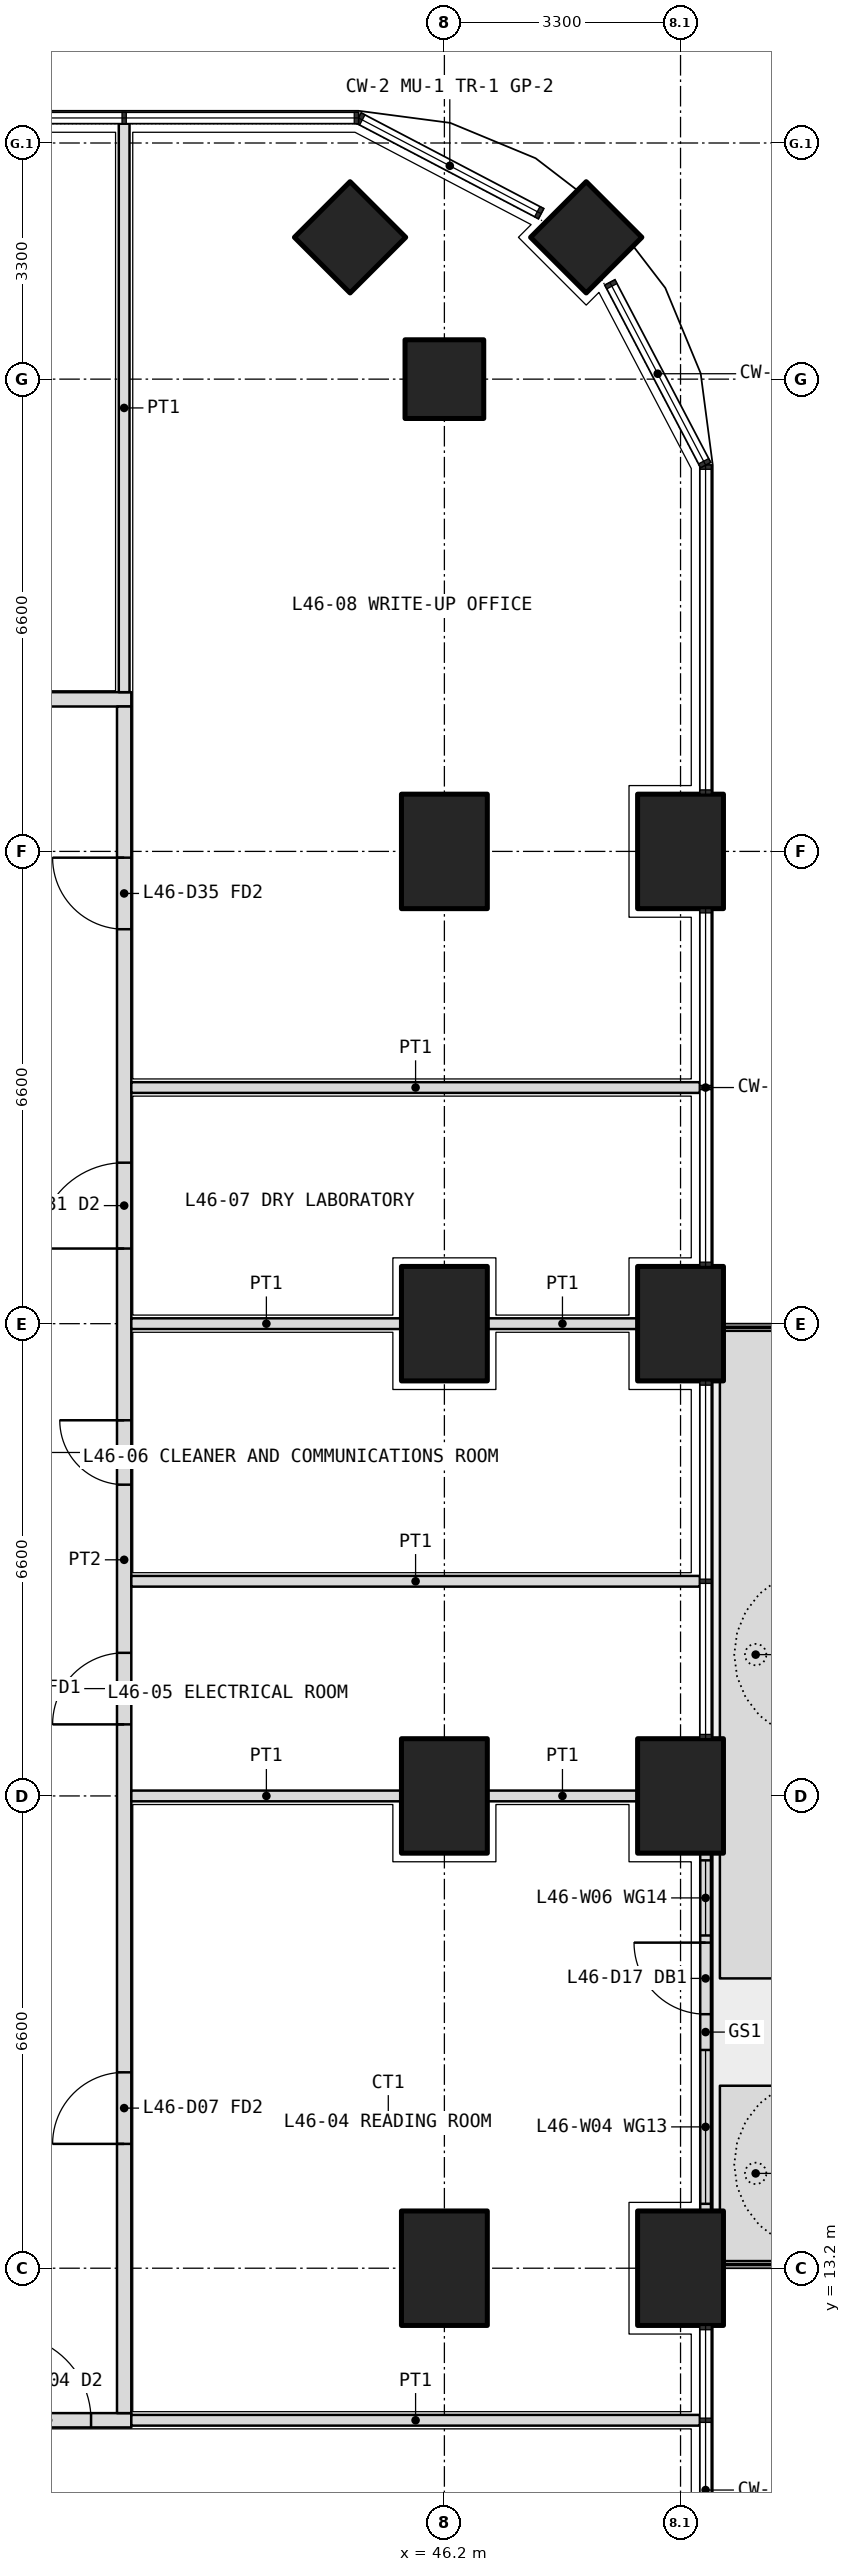
"""IFC4 building model, lengths in metres.
Left out: names, types, materials, properties, quantities, classifications, styles, units other than length and angle.
Written with IfcOpenShell. Run it as: python <this file> out.ifc"""

import sys

from ifc_helpers import new_model, si_unit, direction, frame, frame_2d, origin, origin_2d, place, context, subcontext, project, spatial, polyline, rectangle, outline, extrude, element, fill, save


model = new_model("IFC4")
c1 = context("Model", 3, precision=1e-05, world=origin(), true_north=direction((0.0, 1.0)))
c2 = subcontext(c1, "Body", "Model", "MODEL_VIEW")
j1 = project(units=[si_unit("LENGTHUNIT", "METRE"), si_unit("PLANEANGLEUNIT", "RADIAN")], contexts=[c1])
p1 = place(None, origin())
s1 = spatial("IfcSite", under=j1, at=p1, CompositionType="ELEMENT")
p2 = place(p1, origin())
s2 = spatial("IfcBuilding", under=s1, at=p2, CompositionType="ELEMENT")
p3 = place(p2, frame((0.0, 0.0, 201.9)))
s3 = spatial("IfcBuildingStorey", under=s2, at=p3, CompositionType="ELEMENT", Elevation=201.9)
p4 = place(p3, frame((48.182, 41.582, 0.0), z_axis=(0.0, 0.0, 1.0), x_axis=(0.707106781187, 0.707106781187, 0.0)))
e1 = element("IfcColumn", 1, at=p4, inside=s3, PredefinedType="COLUMN", context=c2, shape_type="SweptSolid", body=[
    extrude(rectangle(XDim=1.1, YDim=1.1, at=origin_2d()), origin(), (0.0, 0.0, 1.0), 4.2),
])
for number, where, z_axis, x_axis in (
    (2, (49.5, 13.2, 0.0), (0.0, 0.0, 1.0), (0.0, 1.0, 0.0)),
    (3, (49.5, 19.8, 0.0), (0.0, 0.0, 1.0), (0.0, 1.0, 0.0)),
    (4, (49.5, 26.4, 0.0), (0.0, 0.0, 1.0), (0.0, 1.0, 0.0)),
    (5, (49.5, 33.0, 0.0), (0.0, 0.0, 1.0), (0.0, 1.0, 0.0)),
):
    element("IfcColumn", number, at=place(p3, frame(where, z_axis=z_axis, x_axis=x_axis)), inside=s3, PredefinedType="COLUMN", context=c2, shape_type="SweptSolid", body=[
        extrude(rectangle(XDim=1.6, YDim=1.2, at=origin_2d()), origin(), (0.0, 0.0, 1.0), 4.2),
    ])
for number, where, z_axis, x_axis in (
    (6, (46.2, 39.6, 0.0), (0.0, 0.0, 1.0), (1.0, 0.0, 0.0)),
    (7, (44.882, 41.582, 0.0), (0.0, 0.0, 1.0), (0.707, 0.707, 0.0)),
):
    element("IfcColumn", number, at=place(p3, frame(where, z_axis=z_axis, x_axis=x_axis)), inside=s3, PredefinedType="COLUMN", context=c2, shape_type="SweptSolid", body=[
        extrude(rectangle(XDim=1.1, YDim=1.1, at=origin_2d()), origin(), (0.0, 0.0, 1.0), 4.2),
    ])
for number, where, z_axis, x_axis in (
    (8, (46.2, 13.2, 0.0), (0.0, 0.0, 1.0), (0.0, 1.0, 0.0)),
    (9, (46.2, 19.8, 0.0), (0.0, 0.0, 1.0), (0.0, 1.0, 0.0)),
    (10, (46.2, 26.4, 0.0), (0.0, 0.0, 1.0), (0.0, 1.0, 0.0)),
    (11, (46.2, 33.0, 0.0), (0.0, 0.0, 1.0), (0.0, 1.0, 0.0)),
):
    element("IfcColumn", number, at=place(p3, frame(where, z_axis=z_axis, x_axis=x_axis)), inside=s3, PredefinedType="COLUMN", context=c2, shape_type="SweptSolid", body=[
        extrude(rectangle(XDim=1.6, YDim=1.2, at=origin_2d()), origin(), (0.0, 0.0, 1.0), 4.2),
    ])
p5 = place(p3, origin())
e12 = element("IfcWall", 12, at=p5, inside=s3, PredefinedType="USERDEFINED", context=c2, shape_type="SweptSolid", body=[
    extrude(outline(polyline([(50.05, 13.3), (51.05, 13.3), (51.05, 15.75), (50.05, 15.75), (50.05, 13.3)]), holes=[polyline([(50.2, 13.45), (50.9, 13.45), (50.9, 15.6), (50.2, 15.6), (50.2, 13.45)])]), origin(), (0.0, 0.0, 1.0), 1.05),
])
p6 = place(p3, origin())
e13 = element("IfcWall", 13, at=p6, inside=s3, PredefinedType="USERDEFINED", context=c2, shape_type="SweptSolid", body=[
    extrude(outline(polyline([(50.05, 17.25), (51.05, 17.25), (51.05, 26.3), (50.05, 26.3), (50.05, 17.25)]), holes=[polyline([(50.2, 17.4), (50.9, 17.4), (50.9, 26.15), (50.2, 26.15), (50.2, 17.4)])]), origin(), (0.0, 0.0, 1.0), 1.05),
])
p7 = place(p3, frame((49.85, 14.0, 0.0), z_axis=(0.0, 0.0, 1.0), x_axis=(0.0, 1.0, 0.0)))
e14 = element("IfcWall", 14, at=p7, inside=s3, PredefinedType="SOLIDWALL", context=c2, shape_type="SweptSolid", body=[
    extrude(rectangle(XDim=5.0, YDim=0.15, at=frame_2d((2.5, 0.0))), origin(), (0.0, 0.0, 1.0), 2.7),
])
p8 = place(p7, frame((2.75, 0.0, 0.0)))
e15 = element("IfcOpeningElement", 15, at=p8, cuts=e14, PredefinedType="OPENING", context=c2, shape_type="SweptSolid", body=[
    extrude(rectangle(XDim=1.0, YDim=2.4, at=frame_2d((0.5, 1.2))), frame((0.0, 0.085, 0.0), z_axis=(0.0, -1.0, 0.0), x_axis=(1.0, 0.0, 0.0)), (0.0, 0.0, 1.0), 0.17),
])
p9 = place(p7, frame((0.1, 0.0, 0.1)))
e16 = element("IfcOpeningElement", 16, at=p9, cuts=e14, PredefinedType="OPENING", context=c2, shape_type="SweptSolid", body=[
    extrude(rectangle(XDim=2.15, YDim=2.3, at=frame_2d((1.075, 1.15))), frame((0.0, 0.085, 0.0), z_axis=(0.0, -1.0, 0.0), x_axis=(1.0, 0.0, 0.0)), (0.0, 0.0, 1.0), 0.17),
])
p10 = place(p7, frame((3.85, 0.0, 0.1)))
e17 = element("IfcOpeningElement", 17, at=p10, cuts=e14, PredefinedType="OPENING", context=c2, shape_type="SweptSolid", body=[
    extrude(rectangle(XDim=1.05, YDim=2.3, at=frame_2d((0.525, 1.15))), frame((0.0, 0.085, 0.0), z_axis=(0.0, -1.0, 0.0), x_axis=(1.0, 0.0, 0.0)), (0.0, 0.0, 1.0), 0.17),
])
p11 = place(p3, frame((10.975, 11.075, 0.0), z_axis=(0.0, 0.0, 1.0), x_axis=(1.0, 0.0, 0.0)))
e18 = element("IfcWall", 18, at=p11, inside=s3, PredefinedType="PARTITIONING", context=c2, shape_type="SweptSolid", body=[
    extrude(rectangle(XDim=30.85, YDim=0.2, at=frame_2d((15.425, 0.0))), origin(), (0.0, 0.0, 1.0), 2.85),
])
p12 = place(p11, frame((2.212, 0.0, 0.0)))
e19 = element("IfcOpeningElement", 19, at=p12, cuts=e18, PredefinedType="OPENING", context=c2, shape_type="SweptSolid", body=[
    extrude(rectangle(XDim=1.2, YDim=2.1, at=frame_2d((0.6, 1.05))), frame((0.0, 0.11, 0.0), z_axis=(0.0, -1.0, 0.0), x_axis=(1.0, 0.0, 0.0)), (0.0, 0.0, 1.0), 0.22),
])
p13 = place(p11, frame((16.475, 0.0, 0.0)))
e20 = element("IfcOpeningElement", 20, at=p13, cuts=e18, PredefinedType="OPENING", context=c2, shape_type="SweptSolid", body=[
    extrude(rectangle(XDim=1.2, YDim=2.1, at=frame_2d((0.6, 1.05))), frame((0.0, 0.11, 0.0), z_axis=(0.0, -1.0, 0.0), x_axis=(1.0, 0.0, 0.0)), (0.0, 0.0, 1.0), 0.22),
])
p14 = place(p11, frame((29.087, 0.0, 0.0)))
e21 = element("IfcOpeningElement", 21, at=p14, cuts=e18, PredefinedType="OPENING", context=c2, shape_type="SweptSolid", body=[
    extrude(rectangle(XDim=1.2, YDim=2.1, at=frame_2d((0.6, 1.05))), frame((0.0, 0.11, 0.0), z_axis=(0.0, -1.0, 0.0), x_axis=(1.0, 0.0, 0.0)), (0.0, 0.0, 1.0), 0.22),
])
p15 = place(p3, frame((10.975, 35.125, 0.0), z_axis=(0.0, 0.0, 1.0), x_axis=(1.0, 0.0, 0.0)))
e22 = element("IfcWall", 22, at=p15, inside=s3, PredefinedType="PARTITIONING", context=c2, shape_type="SweptSolid", body=[
    extrude(rectangle(XDim=30.85, YDim=0.2, at=frame_2d((15.425, 0.0))), origin(), (0.0, 0.0, 1.0), 2.85),
])
p16 = place(p15, frame((0.562, 0.0, 0.0)))
e23 = element("IfcOpeningElement", 23, at=p16, cuts=e22, PredefinedType="OPENING", context=c2, shape_type="SweptSolid", body=[
    extrude(rectangle(XDim=1.2, YDim=2.1, at=frame_2d((0.6, 1.05))), frame((0.0, 0.11, 0.0), z_axis=(0.0, -1.0, 0.0), x_axis=(1.0, 0.0, 0.0)), (0.0, 0.0, 1.0), 0.22),
])
p17 = place(p15, frame((3.425, 0.0, 0.0)))
e24 = element("IfcOpeningElement", 24, at=p17, cuts=e22, PredefinedType="OPENING", context=c2, shape_type="SweptSolid", body=[
    extrude(rectangle(XDim=1.0, YDim=2.1, at=frame_2d((0.5, 1.05))), frame((0.0, 0.11, 0.0), z_axis=(0.0, -1.0, 0.0), x_axis=(1.0, 0.0, 0.0)), (0.0, 0.0, 1.0), 0.22),
])
p18 = place(p15, frame((6.725, 0.0, 0.0)))
e25 = element("IfcOpeningElement", 25, at=p18, cuts=e22, PredefinedType="OPENING", context=c2, shape_type="SweptSolid", body=[
    extrude(rectangle(XDim=1.0, YDim=2.1, at=frame_2d((0.5, 1.05))), frame((0.0, 0.11, 0.0), z_axis=(0.0, -1.0, 0.0), x_axis=(1.0, 0.0, 0.0)), (0.0, 0.0, 1.0), 0.22),
])
p19 = place(p15, frame((9.975, 0.0, 0.0)))
e26 = element("IfcOpeningElement", 26, at=p19, cuts=e22, PredefinedType="OPENING", context=c2, shape_type="SweptSolid", body=[
    extrude(rectangle(XDim=1.0, YDim=2.1, at=frame_2d((0.5, 1.05))), frame((0.0, 0.11, 0.0), z_axis=(0.0, -1.0, 0.0), x_axis=(1.0, 0.0, 0.0)), (0.0, 0.0, 1.0), 0.22),
])
p20 = place(p15, frame((20.938, 0.0, 0.0)))
e27 = element("IfcOpeningElement", 27, at=p20, cuts=e22, PredefinedType="OPENING", context=c2, shape_type="SweptSolid", body=[
    extrude(rectangle(XDim=1.0, YDim=2.1, at=frame_2d((0.5, 1.05))), frame((0.0, 0.11, 0.0), z_axis=(0.0, -1.0, 0.0), x_axis=(1.0, 0.0, 0.0)), (0.0, 0.0, 1.0), 0.22),
])
p21 = place(p3, frame((41.725, 11.175, 0.0), z_axis=(0.0, 0.0, 1.0), x_axis=(0.0, 1.0, 0.0)))
e28 = element("IfcWall", 28, at=p21, inside=s3, PredefinedType="PARTITIONING", context=c2, shape_type="SweptSolid", body=[
    extrude(rectangle(XDim=23.85, YDim=0.2, at=frame_2d((11.925, 0.0))), origin(), (0.0, 0.0, 1.0), 2.85),
])
p22 = place(p21, frame((3.762, 0.0, 0.0)))
e29 = element("IfcOpeningElement", 29, at=p22, cuts=e28, PredefinedType="OPENING", context=c2, shape_type="SweptSolid", body=[
    extrude(rectangle(XDim=1.0, YDim=2.1, at=frame_2d((0.5, 1.05))), frame((0.0, 0.11, 0.0), z_axis=(0.0, -1.0, 0.0), x_axis=(1.0, 0.0, 0.0)), (0.0, 0.0, 1.0), 0.22),
])
p23 = place(p21, frame((9.625, 0.0, 0.0)))
e30 = element("IfcOpeningElement", 30, at=p23, cuts=e28, PredefinedType="OPENING", context=c2, shape_type="SweptSolid", body=[
    extrude(rectangle(XDim=1.0, YDim=2.1, at=frame_2d((0.5, 1.05))), frame((0.0, 0.11, 0.0), z_axis=(0.0, -1.0, 0.0), x_axis=(1.0, 0.0, 0.0)), (0.0, 0.0, 1.0), 0.22),
])
p24 = place(p21, frame((12.975, 0.0, 0.0)))
e31 = element("IfcOpeningElement", 31, at=p24, cuts=e28, PredefinedType="OPENING", context=c2, shape_type="SweptSolid", body=[
    extrude(rectangle(XDim=0.9, YDim=2.1, at=frame_2d((0.45, 1.05))), frame((0.0, 0.11, 0.0), z_axis=(0.0, -1.0, 0.0), x_axis=(1.0, 0.0, 0.0)), (0.0, 0.0, 1.0), 0.22),
])
p25 = place(p21, frame((16.275, 0.0, 0.0)))
e32 = element("IfcOpeningElement", 32, at=p25, cuts=e28, PredefinedType="OPENING", context=c2, shape_type="SweptSolid", body=[
    extrude(rectangle(XDim=1.2, YDim=2.1, at=frame_2d((0.6, 1.05))), frame((0.0, 0.11, 0.0), z_axis=(0.0, -1.0, 0.0), x_axis=(1.0, 0.0, 0.0)), (0.0, 0.0, 1.0), 0.22),
])
p26 = place(p21, frame((20.738, 0.0, 0.0)))
e33 = element("IfcOpeningElement", 33, at=p26, cuts=e28, PredefinedType="OPENING", context=c2, shape_type="SweptSolid", body=[
    extrude(rectangle(XDim=1.0, YDim=2.1, at=frame_2d((0.5, 1.05))), frame((0.0, 0.11, 0.0), z_axis=(0.0, -1.0, 0.0), x_axis=(1.0, 0.0, 0.0)), (0.0, 0.0, 1.0), 0.22),
])
p27 = place(p3, frame((49.77, 11.075, 0.0), z_axis=(0.0, 0.0, 1.0), x_axis=(-1.0, 0.0, 0.0)))
e34 = element("IfcWall", 34, at=p27, inside=s3, PredefinedType="PARTITIONING", context=c2, shape_type="SweptSolid", body=[
    extrude(rectangle(XDim=7.945, YDim=0.15, at=frame_2d((3.973, 0.0))), origin(), (0.0, 0.0, 1.0), 2.7),
])
p28 = place(p3, frame((41.725, 43.17, 0.0), z_axis=(0.0, 0.0, 1.0), x_axis=(0.0, -1.0, 0.0)))
e35 = element("IfcWall", 35, at=p28, inside=s3, PredefinedType="PARTITIONING", context=c2, shape_type="SweptSolid", body=[
    extrude(rectangle(XDim=7.945, YDim=0.15, at=frame_2d((3.972, 0.0))), origin(), (0.0, 0.0, 1.0), 2.7),
])
p29 = place(p3, frame((49.77, 22.8, 0.0), z_axis=(0.0, 0.0, 1.0), x_axis=(-1.0, 0.0, 0.0)))
e36 = element("IfcWall", 36, at=p29, inside=s3, PredefinedType="PARTITIONING", context=c2, shape_type="SweptSolid", body=[
    extrude(rectangle(XDim=7.945, YDim=0.15, at=frame_2d((3.973, 0.0))), origin(), (0.0, 0.0, 1.0), 2.7),
])
p30 = place(p3, frame((48.9, 26.4, 0.0), z_axis=(0.0, 0.0, 1.0), x_axis=(-1.0, 0.0, 0.0)))
e37 = element("IfcWall", 37, at=p30, inside=s3, PredefinedType="PARTITIONING", context=c2, shape_type="SweptSolid", body=[
    extrude(rectangle(XDim=2.1, YDim=0.15, at=frame_2d((1.05, 0.0))), origin(), (0.0, 0.0, 1.0), 2.85),
])
p31 = place(p3, frame((45.6, 26.4, 0.0), z_axis=(0.0, 0.0, 1.0), x_axis=(-1.0, 0.0, 0.0)))
e38 = element("IfcWall", 38, at=p31, inside=s3, PredefinedType="PARTITIONING", context=c2, shape_type="SweptSolid", body=[
    extrude(rectangle(XDim=3.775, YDim=0.15, at=frame_2d((1.888, 0.0))), origin(), (0.0, 0.0, 1.0), 2.85),
])
p32 = place(p3, frame((48.9, 19.8, 0.0), z_axis=(0.0, 0.0, 1.0), x_axis=(-1.0, 0.0, 0.0)))
e39 = element("IfcWall", 39, at=p32, inside=s3, PredefinedType="PARTITIONING", context=c2, shape_type="SweptSolid", body=[
    extrude(rectangle(XDim=2.1, YDim=0.15, at=frame_2d((1.05, 0.0))), origin(), (0.0, 0.0, 1.0), 2.85),
])
p33 = place(p3, frame((45.6, 19.8, 0.0), z_axis=(0.0, 0.0, 1.0), x_axis=(-1.0, 0.0, 0.0)))
e40 = element("IfcWall", 40, at=p33, inside=s3, PredefinedType="PARTITIONING", context=c2, shape_type="SweptSolid", body=[
    extrude(rectangle(XDim=3.775, YDim=0.15, at=frame_2d((1.888, 0.0))), origin(), (0.0, 0.0, 1.0), 2.85),
])
p34 = place(p3, frame((49.77, 29.7, 0.0), z_axis=(0.0, 0.0, 1.0), x_axis=(-1.0, 0.0, 0.0)))
e41 = element("IfcWall", 41, at=p34, inside=s3, PredefinedType="PARTITIONING", context=c2, shape_type="SweptSolid", body=[
    extrude(rectangle(XDim=7.945, YDim=0.15, at=frame_2d((3.973, 0.0))), origin(), (0.0, 0.0, 1.0), 2.7),
])
p35 = place(p8, origin())
e42 = element("IfcDoor", 42, at=p35, inside=s3, OperationType="SINGLE_SWING_RIGHT", PredefinedType="DOOR", context=c2, shape_type="SweptSolid", body=[
    extrude(rectangle(XDim=1.0, YDim=2.4, at=frame_2d((0.5, 1.2))), frame((0.0, 0.025, 0.0), z_axis=(0.0, -1.0, 0.0), x_axis=(1.0, 0.0, 0.0)), (0.0, 0.0, 1.0), 0.05),
])
fill(e15, e42)
p36 = place(p9, origin())
e43 = element("IfcWindow", 43, at=p36, inside=s3, PartitioningType="SINGLE_PANEL", PredefinedType="WINDOW", context=c2, shape_type="SweptSolid", body=[
    extrude(rectangle(XDim=2.15, YDim=2.3, at=frame_2d((1.075, 1.15))), frame((0.0, 0.03, 0.0), z_axis=(0.0, -1.0, 0.0), x_axis=(1.0, 0.0, 0.0)), (0.0, 0.0, 1.0), 0.06),
])
fill(e16, e43)
p37 = place(p10, origin())
e44 = element("IfcWindow", 44, at=p37, inside=s3, PartitioningType="SINGLE_PANEL", PredefinedType="WINDOW", context=c2, shape_type="SweptSolid", body=[
    extrude(rectangle(XDim=1.05, YDim=2.3, at=frame_2d((0.525, 1.15))), frame((0.0, 0.03, 0.0), z_axis=(0.0, -1.0, 0.0), x_axis=(1.0, 0.0, 0.0)), (0.0, 0.0, 1.0), 0.06),
])
fill(e17, e44)
p38 = place(p14, origin())
e45 = element("IfcDoor", 45, at=p38, inside=s3, OperationType="DOUBLE_DOOR_SINGLE_SWING", PredefinedType="DOOR", context=c2, shape_type="SweptSolid", body=[
    extrude(rectangle(XDim=1.2, YDim=2.1, at=frame_2d((0.6, 1.05))), frame((0.0, 0.025, 0.0), z_axis=(0.0, -1.0, 0.0), x_axis=(1.0, 0.0, 0.0)), (0.0, 0.0, 1.0), 0.05),
])
fill(e21, e45)
p39 = place(p22, origin())
e46 = element("IfcDoor", 46, at=p39, inside=s3, OperationType="SINGLE_SWING_LEFT", PredefinedType="DOOR", context=c2, shape_type="SweptSolid", body=[
    extrude(rectangle(XDim=1.0, YDim=2.1, at=frame_2d((0.5, 1.05))), frame((0.0, 0.025, 0.0), z_axis=(0.0, -1.0, 0.0), x_axis=(1.0, 0.0, 0.0)), (0.0, 0.0, 1.0), 0.05),
])
fill(e29, e46)
p40 = place(p23, origin())
e47 = element("IfcDoor", 47, at=p40, inside=s3, OperationType="SINGLE_SWING_LEFT", PredefinedType="DOOR", context=c2, shape_type="SweptSolid", body=[
    extrude(rectangle(XDim=1.0, YDim=2.1, at=frame_2d((0.5, 1.05))), frame((0.0, 0.025, 0.0), z_axis=(0.0, -1.0, 0.0), x_axis=(1.0, 0.0, 0.0)), (0.0, 0.0, 1.0), 0.05),
])
fill(e30, e47)
p41 = place(p24, origin())
e48 = element("IfcDoor", 48, at=p41, inside=s3, OperationType="SINGLE_SWING_RIGHT", PredefinedType="DOOR", context=c2, shape_type="SweptSolid", body=[
    extrude(rectangle(XDim=0.9, YDim=2.1, at=frame_2d((0.45, 1.05))), frame((0.0, 0.025, 0.0), z_axis=(0.0, -1.0, 0.0), x_axis=(1.0, 0.0, 0.0)), (0.0, 0.0, 1.0), 0.05),
])
fill(e31, e48)
p42 = place(p25, origin())
e49 = element("IfcDoor", 49, at=p42, inside=s3, OperationType="DOUBLE_DOOR_SINGLE_SWING", PredefinedType="DOOR", context=c2, shape_type="SweptSolid", body=[
    extrude(rectangle(XDim=1.2, YDim=2.1, at=frame_2d((0.6, 1.05))), frame((0.0, 0.025, 0.0), z_axis=(0.0, -1.0, 0.0), x_axis=(1.0, 0.0, 0.0)), (0.0, 0.0, 1.0), 0.05),
])
fill(e32, e49)
p43 = place(p26, origin())
e50 = element("IfcDoor", 50, at=p43, inside=s3, OperationType="SINGLE_SWING_RIGHT", PredefinedType="DOOR", context=c2, shape_type="SweptSolid", body=[
    extrude(rectangle(XDim=1.0, YDim=2.1, at=frame_2d((0.5, 1.05))), frame((0.0, 0.025, 0.0), z_axis=(0.0, -1.0, 0.0), x_axis=(1.0, 0.0, 0.0)), (0.0, 0.0, 1.0), 0.05),
])
fill(e33, e50)
save(model, sys.argv[1])
